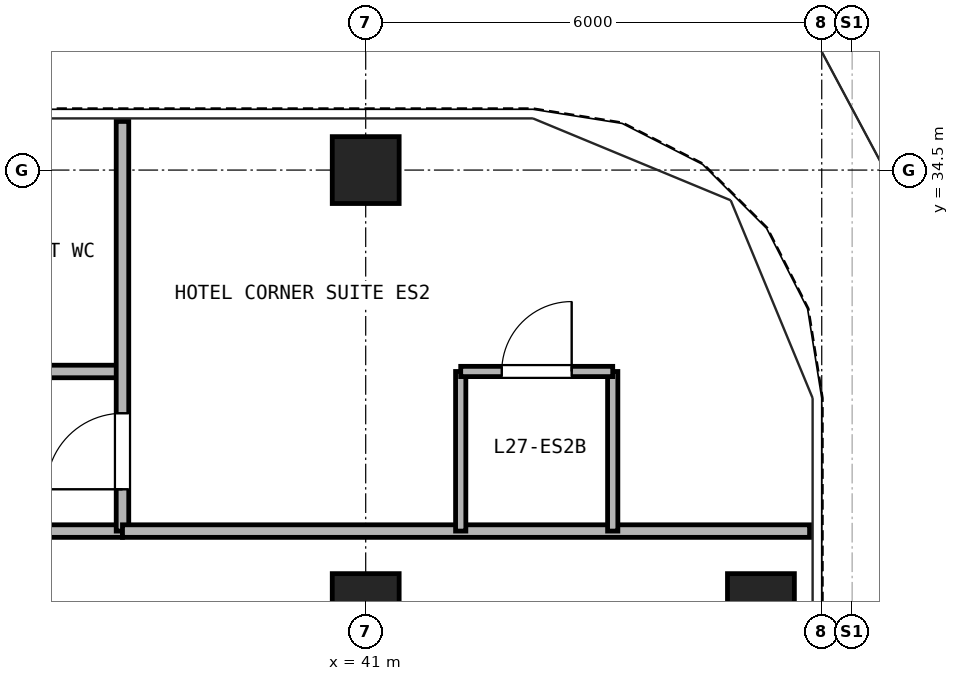
"""IFC4 building model, lengths in metres.
Left out: names, types, materials, properties, quantities, classifications, styles, units other than length and angle.
Written with IfcOpenShell. Run it as: python <this file> out.ifc"""

import sys

from ifc_helpers import new_model, si_unit, direction, frame, frame_2d, origin, origin_2d, place, context, subcontext, project, spatial, rectangle, hollow_rectangle, extrude, source, transform, mapped, element, fill, save


model = new_model("IFC4")
c1 = context("Model", 3, precision=1e-05, world=origin(), true_north=direction((0.0, 1.0)))
c2 = subcontext(c1, "Body", "Model", "MODEL_VIEW")
j1 = project(units=[si_unit("LENGTHUNIT", "METRE"), si_unit("PLANEANGLEUNIT", "RADIAN")], contexts=[c1])
p1 = place(None, origin())
s1 = spatial("IfcSite", under=j1, at=p1, CompositionType="ELEMENT")
p2 = place(p1, origin())
s2 = spatial("IfcBuilding", under=s1, at=p2, CompositionType="ELEMENT")
p3 = place(p2, frame((0.0, 0.0, 102.3)))
s3 = spatial("IfcBuildingStorey", under=s2, at=p3, CompositionType="ELEMENT", Elevation=102.3)
m1 = source(origin(), c2, "Body", "SweptSolid", [
    extrude(hollow_rectangle(XDim=0.88, YDim=0.88, WallThickness=0.05, at=origin_2d()), origin(), (0.0, 0.0, 1.0), 2.95),
])
for number, where, z_axis, x_axis in (
    (1, (41.0, 34.5, 0.0), (0.0, 0.0, 1.0), (1.0, 0.0, 0.0)),
    (2, (46.2, 28.75, 0.0), (0.0, 0.0, 1.0), (1.0, 0.0, 0.0)),
    (3, (41.0, 28.75, 0.0), (0.0, 0.0, 1.0), (1.0, 0.0, 0.0)),
):
    element("IfcColumn", number, at=place(p3, frame(where, z_axis=z_axis, x_axis=x_axis)), inside=s3, PredefinedType="COLUMN", context=c2, shape_type="MappedRepresentation", body=[
        mapped(m1, transform((0.0, 0.0, 0.0), x_axis=(1.0, 0.0, 0.0), y_axis=(0.0, 1.0, 0.0), z_axis=(0.0, 0.0, 1.0), scale=1.0)),
    ])
p4 = place(p3, frame((9.2, 31.85, 0.0), z_axis=(0.0, 0.0, 1.0), x_axis=(1.0, 0.0, 0.0)))
e4 = element("IfcWall", 4, at=p4, inside=s3, PredefinedType="PARTITIONING", context=c2, shape_type="SweptSolid", body=[
    extrude(rectangle(XDim=28.6, YDim=0.165, at=frame_2d((14.3, 0.0))), origin(), (0.0, 0.0, 1.0), 2.583),
])
p5 = place(p4, frame((3.15, 0.0, 0.0)))
e5 = element("IfcOpeningElement", 5, at=p5, cuts=e4, PredefinedType="OPENING", context=c2, shape_type="SweptSolid", body=[
    extrude(rectangle(XDim=0.95, YDim=2.15, at=frame_2d((0.475, 1.075))), frame((0.0, 0.093, 0.0), z_axis=(0.0, -1.0, 0.0), x_axis=(1.0, 0.0, 0.0)), (0.0, 0.0, 1.0), 0.185),
])
p6 = place(p4, frame((11.8, 0.0, 0.0)))
e6 = element("IfcOpeningElement", 6, at=p6, cuts=e4, PredefinedType="OPENING", context=c2, shape_type="SweptSolid", body=[
    extrude(rectangle(XDim=0.95, YDim=2.15, at=frame_2d((0.475, 1.075))), frame((0.0, 0.093, 0.0), z_axis=(0.0, -1.0, 0.0), x_axis=(1.0, 0.0, 0.0)), (0.0, 0.0, 1.0), 0.185),
])
p7 = place(p4, frame((20.3, 0.0, 0.0)))
e7 = element("IfcOpeningElement", 7, at=p7, cuts=e4, PredefinedType="OPENING", context=c2, shape_type="SweptSolid", body=[
    extrude(rectangle(XDim=0.95, YDim=2.15, at=frame_2d((0.475, 1.075))), frame((0.0, 0.093, 0.0), z_axis=(0.0, -1.0, 0.0), x_axis=(1.0, 0.0, 0.0)), (0.0, 0.0, 1.0), 0.185),
])
p8 = place(p4, frame((25.95, 0.0, 0.0)))
e8 = element("IfcOpeningElement", 8, at=p8, cuts=e4, PredefinedType="OPENING", context=c2, shape_type="SweptSolid", body=[
    extrude(rectangle(XDim=0.92, YDim=2.1, at=frame_2d((0.46, 1.05))), frame((0.0, 0.093, 0.0), z_axis=(0.0, -1.0, 0.0), x_axis=(1.0, 0.0, 0.0)), (0.0, 0.0, 1.0), 0.185),
])
p9 = place(p3, frame((30.7, 29.75, 0.0), z_axis=(0.0, 0.0, 1.0), x_axis=(1.0, 0.0, 0.0)))
e9 = element("IfcWall", 9, at=p9, inside=s3, PredefinedType="PARTITIONING", context=c2, shape_type="SweptSolid", body=[
    extrude(rectangle(XDim=7.1, YDim=0.165, at=frame_2d((3.55, 0.0))), origin(), (0.0, 0.0, 1.0), 2.95),
])
p10 = place(p3, frame((37.8, 29.75, 0.0), z_axis=(0.0, 0.0, 1.0), x_axis=(0.0, 1.0, 0.0)))
e10 = element("IfcWall", 10, at=p10, inside=s3, PredefinedType="PARTITIONING", context=c2, shape_type="SweptSolid", body=[
    extrude(rectangle(XDim=5.39, YDim=0.165, at=frame_2d((2.695, 0.0))), origin(), (0.0, 0.0, 1.0), 2.95),
])
p11 = place(p10, frame((0.55, 0.0, 0.0)))
e11 = element("IfcOpeningElement", 11, at=p11, cuts=e10, PredefinedType="OPENING", context=c2, shape_type="SweptSolid", body=[
    extrude(rectangle(XDim=1.0, YDim=2.15, at=frame_2d((0.5, 1.075))), frame((0.0, 0.093, 0.0), z_axis=(0.0, -1.0, 0.0), x_axis=(1.0, 0.0, 0.0)), (0.0, 0.0, 1.0), 0.185),
])
p12 = place(p3, frame((37.8, 29.75, 0.0), z_axis=(0.0, 0.0, 1.0), x_axis=(1.0, 0.0, 0.0)))
e12 = element("IfcWall", 12, at=p12, inside=s3, PredefinedType="PARTITIONING", context=c2, shape_type="SweptSolid", body=[
    extrude(rectangle(XDim=9.04, YDim=0.165, at=frame_2d((4.52, 0.0))), origin(), (0.0, 0.0, 1.0), 2.95),
])
for number, where, z_axis, x_axis in (
    (13, (42.25, 29.75, 0.0), (0.0, 0.0, 1.0), (0.0, 1.0, 0.0)),
    (14, (44.25, 29.75, 0.0), (0.0, 0.0, 1.0), (0.0, 1.0, 0.0)),
):
    element("IfcWall", number, at=place(p3, frame(where, z_axis=z_axis, x_axis=x_axis)), inside=s3, PredefinedType="PARTITIONING", context=c2, shape_type="SweptSolid", body=[
        extrude(rectangle(XDim=2.1, YDim=0.135, at=frame_2d((1.05, 0.0))), origin(), (0.0, 0.0, 1.0), 2.95),
    ])
p13 = place(p3, frame((42.25, 31.85, 0.0), z_axis=(0.0, 0.0, 1.0), x_axis=(1.0, 0.0, 0.0)))
e15 = element("IfcWall", 15, at=p13, inside=s3, PredefinedType="PARTITIONING", context=c2, shape_type="SweptSolid", body=[
    extrude(rectangle(XDim=2.0, YDim=0.135, at=frame_2d((1.0, 0.0))), origin(), (0.0, 0.0, 1.0), 2.95),
])
p14 = place(p13, frame((0.54, 0.0, 0.0)))
e16 = element("IfcOpeningElement", 16, at=p14, cuts=e15, PredefinedType="OPENING", context=c2, shape_type="SweptSolid", body=[
    extrude(rectangle(XDim=0.92, YDim=2.1, at=frame_2d((0.46, 1.05))), frame((0.0, 0.077, 0.0), z_axis=(0.0, -1.0, 0.0), x_axis=(1.0, 0.0, 0.0)), (0.0, 0.0, 1.0), 0.155),
])
p15 = place(p14, frame((0.92, 0.0, 0.0), z_axis=(0.0, 0.0, 1.0), x_axis=(-1.0, 0.0, 0.0)))
e17 = element("IfcDoor", 17, at=p15, inside=s3, OperationType="SINGLE_SWING_RIGHT", PredefinedType="DOOR", context=c2, shape_type="SweptSolid", body=[
    extrude(rectangle(XDim=0.92, YDim=2.1, at=frame_2d((0.46, 1.05))), frame((0.0, 0.025, 0.0), z_axis=(0.0, -1.0, 0.0), x_axis=(1.0, 0.0, 0.0)), (0.0, 0.0, 1.0), 0.05),
])
fill(e16, e17)
p16 = place(p11, frame((1.0, 0.0, 0.0), z_axis=(0.0, 0.0, 1.0), x_axis=(-1.0, 0.0, 0.0)))
e18 = element("IfcDoor", 18, at=p16, inside=s3, OperationType="SINGLE_SWING_LEFT", PredefinedType="DOOR", context=c2, shape_type="SweptSolid", body=[
    extrude(rectangle(XDim=1.0, YDim=2.15, at=frame_2d((0.5, 1.075))), frame((0.0, 0.025, 0.0), z_axis=(0.0, -1.0, 0.0), x_axis=(1.0, 0.0, 0.0)), (0.0, 0.0, 1.0), 0.05),
])
fill(e11, e18)
save(model, sys.argv[1])
